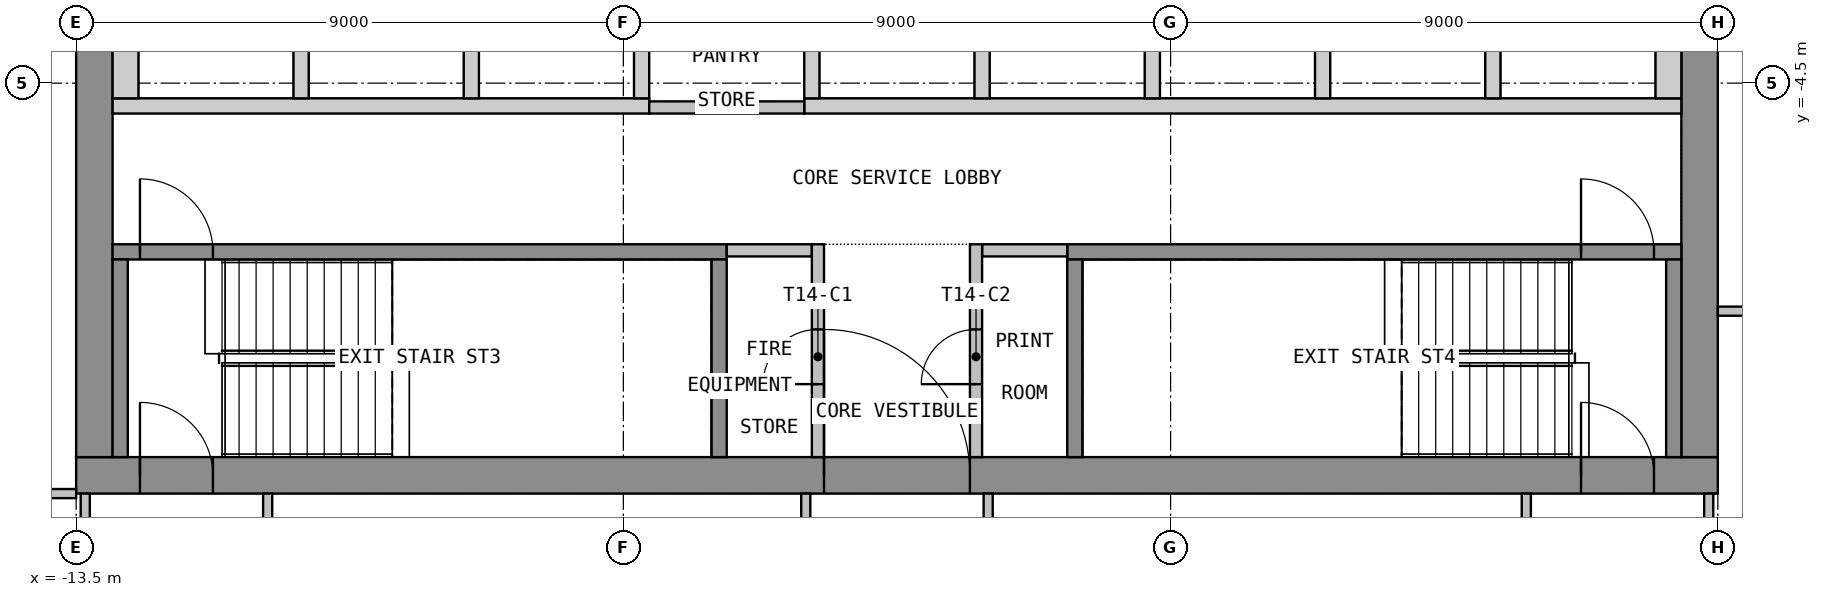
"""IFC4 building model, lengths in metres.
Left out: names, types, materials, properties, quantities, classifications, styles, units other than length and angle.
Written with IfcOpenShell. Run it as: python <this file> out.ifc"""

import sys

from ifc_helpers import new_model, si_unit, direction, frame, frame_2d, origin, place, context, subcontext, project, spatial, polyline, rectangle, outline, extrude, element, fill, save


model = new_model("IFC4")
c1 = context("Model", 3, precision=1e-05, world=origin(), true_north=direction((0.0, 1.0)))
c2 = subcontext(c1, "Body", "Model", "MODEL_VIEW")
j1 = project(units=[si_unit("LENGTHUNIT", "METRE"), si_unit("PLANEANGLEUNIT", "RADIAN")], contexts=[c1])
p1 = place(None, origin())
s1 = spatial("IfcSite", under=j1, at=p1, CompositionType="ELEMENT")
p2 = place(p1, origin())
s2 = spatial("IfcBuilding", under=s1, at=p2, CompositionType="ELEMENT")
p3 = place(p2, frame((0.0, 0.0, 195.6)))
s3 = spatial("IfcBuildingStorey", under=s2, at=p3, CompositionType="ELEMENT", Elevation=195.6)
p4 = place(p3, frame((-13.5, -10.95, 0.0), z_axis=(0.0, 0.0, 1.0), x_axis=(1.0, 0.0, 0.0)))
e1 = element("IfcWall", 1, at=p4, inside=s3, PredefinedType="SHEAR", context=c2, shape_type="SweptSolid", body=[
    extrude(rectangle(XDim=27.0, YDim=0.6, at=frame_2d((13.5, 0.0))), origin(), (0.0, 0.0, 1.0), 3.55),
])
p5 = place(p4, frame((12.3, 0.0, 0.0)))
e2 = element("IfcOpeningElement", 2, at=p5, cuts=e1, PredefinedType="OPENING", context=c2, shape_type="SweptSolid", body=[
    extrude(rectangle(XDim=2.4, YDim=2.1, at=frame_2d((1.2, 1.05))), frame((0.0, 0.31, 0.0), z_axis=(0.0, -1.0, 0.0), x_axis=(1.0, 0.0, 0.0)), (0.0, 0.0, 1.0), 0.62),
])
p6 = place(p4, frame((1.05, 0.0, 0.0)))
e3 = element("IfcOpeningElement", 3, at=p6, cuts=e1, PredefinedType="OPENING", context=c2, shape_type="SweptSolid", body=[
    extrude(rectangle(XDim=1.2, YDim=2.1, at=frame_2d((0.6, 1.05))), frame((0.0, 0.31, 0.0), z_axis=(0.0, -1.0, 0.0), x_axis=(1.0, 0.0, 0.0)), (0.0, 0.0, 1.0), 0.62),
])
p7 = place(p4, frame((24.75, 0.0, 0.0)))
e4 = element("IfcOpeningElement", 4, at=p7, cuts=e1, PredefinedType="OPENING", context=c2, shape_type="SweptSolid", body=[
    extrude(rectangle(XDim=1.2, YDim=2.1, at=frame_2d((0.6, 1.05))), frame((0.0, 0.31, 0.0), z_axis=(0.0, -1.0, 0.0), x_axis=(1.0, 0.0, 0.0)), (0.0, 0.0, 1.0), 0.62),
])
p8 = place(p3, frame((-13.2, -10.65, 0.0), z_axis=(0.0, 0.0, 1.0), x_axis=(0.0, 1.0, 0.0)))
e5 = element("IfcWall", 5, at=p8, inside=s3, PredefinedType="SHEAR", context=c2, shape_type="SweptSolid", body=[
    extrude(rectangle(XDim=21.3, YDim=0.6, at=frame_2d((10.65, 0.0))), origin(), (0.0, 0.0, 1.0), 3.55),
])
p9 = place(p8, frame((9.45, 0.0, 0.0)))
e6 = element("IfcOpeningElement", 6, at=p9, cuts=e5, PredefinedType="OPENING", context=c2, shape_type="SweptSolid", body=[
    extrude(rectangle(XDim=2.4, YDim=2.1, at=frame_2d((1.2, 1.05))), frame((0.0, 0.31, 0.0), z_axis=(0.0, -1.0, 0.0), x_axis=(1.0, 0.0, 0.0)), (0.0, 0.0, 1.0), 0.62),
])
p10 = place(p3, frame((13.2, -10.65, 0.0), z_axis=(0.0, 0.0, 1.0), x_axis=(0.0, 1.0, 0.0)))
e7 = element("IfcWall", 7, at=p10, inside=s3, PredefinedType="SHEAR", context=c2, shape_type="SweptSolid", body=[
    extrude(rectangle(XDim=21.3, YDim=0.6, at=frame_2d((10.65, 0.0))), origin(), (0.0, 0.0, 1.0), 3.55),
])
p11 = place(p10, frame((9.45, 0.0, 0.0)))
e8 = element("IfcOpeningElement", 8, at=p11, cuts=e7, PredefinedType="OPENING", context=c2, shape_type="SweptSolid", body=[
    extrude(rectangle(XDim=2.4, YDim=2.1, at=frame_2d((1.2, 1.05))), frame((0.0, 0.31, 0.0), z_axis=(0.0, -1.0, 0.0), x_axis=(1.0, 0.0, 0.0)), (0.0, 0.0, 1.0), 0.62),
])
p12 = place(p3, origin())
e9 = element("IfcWall", 9, at=p12, inside=s3, PredefinedType="SHEAR", context=c2, shape_type="SweptSolid", body=[
    extrude(outline(polyline([(-12.9, -5.0), (-4.075, -5.0), (-4.075, -4.75), (-12.9, -4.75), (-12.9, -5.0)])), origin(), (0.0, 0.0, 1.0), 3.55),
])
p13 = place(p3, origin())
e10 = element("IfcWall", 10, at=p13, inside=s3, PredefinedType="SHEAR", context=c2, shape_type="SweptSolid", body=[
    extrude(outline(polyline([(-1.525, -5.0), (12.9, -5.0), (12.9, -4.75), (-1.525, -4.75), (-1.525, -5.0)])), origin(), (0.0, 0.0, 1.0), 3.55),
])
p14 = place(p3, origin())
e11 = element("IfcWall", 11, at=p14, inside=s3, PredefinedType="SHEAR", context=c2, shape_type="SweptSolid", body=[
    extrude(outline(polyline([(-12.9, -4.75), (-12.475, -4.75), (-12.475, -3.05), (-12.9, -3.05), (-12.9, -4.75)])), origin(), (0.0, 0.0, 1.0), 3.55),
])
p15 = place(p3, origin())
e12 = element("IfcWall", 12, at=p15, inside=s3, PredefinedType="SHEAR", context=c2, shape_type="SweptSolid", body=[
    extrude(outline(polyline([(-9.925, -4.75), (-9.675, -4.75), (-9.675, -3.05), (-9.925, -3.05), (-9.925, -4.75)])), origin(), (0.0, 0.0, 1.0), 3.55),
])
p16 = place(p3, origin())
e13 = element("IfcWall", 13, at=p16, inside=s3, PredefinedType="SHEAR", context=c2, shape_type="SweptSolid", body=[
    extrude(outline(polyline([(-7.125, -4.75), (-6.875, -4.75), (-6.875, -3.05), (-7.125, -3.05), (-7.125, -4.75)])), origin(), (0.0, 0.0, 1.0), 3.55),
])
p17 = place(p3, origin())
e14 = element("IfcWall", 14, at=p17, inside=s3, PredefinedType="SHEAR", context=c2, shape_type="SweptSolid", body=[
    extrude(outline(polyline([(-4.325, -4.75), (-4.075, -4.75), (-4.075, -3.05), (-4.325, -3.05), (-4.325, -4.75)])), origin(), (0.0, 0.0, 1.0), 3.55),
])
p18 = place(p3, origin())
e15 = element("IfcWall", 15, at=p18, inside=s3, PredefinedType="SHEAR", context=c2, shape_type="SweptSolid", body=[
    extrude(outline(polyline([(-1.525, -4.75), (-1.275, -4.75), (-1.275, -2.05), (-1.525, -2.05), (-1.525, -4.75)])), origin(), (0.0, 0.0, 1.0), 3.55),
])
p19 = place(p3, origin())
e16 = element("IfcWall", 16, at=p19, inside=s3, PredefinedType="SHEAR", context=c2, shape_type="SweptSolid", body=[
    extrude(outline(polyline([(1.275, -4.75), (1.525, -4.75), (1.525, -2.05), (1.275, -2.05), (1.275, -4.75)])), origin(), (0.0, 0.0, 1.0), 3.55),
])
p20 = place(p3, origin())
e17 = element("IfcWall", 17, at=p20, inside=s3, PredefinedType="SHEAR", context=c2, shape_type="SweptSolid", body=[
    extrude(outline(polyline([(4.075, -4.75), (4.325, -4.75), (4.325, -2.05), (4.075, -2.05), (4.075, -4.75)])), origin(), (0.0, 0.0, 1.0), 3.55),
])
p21 = place(p3, origin())
e18 = element("IfcWall", 18, at=p21, inside=s3, PredefinedType="SHEAR", context=c2, shape_type="SweptSolid", body=[
    extrude(outline(polyline([(6.875, -4.75), (7.125, -4.75), (7.125, -2.05), (6.875, -2.05), (6.875, -4.75)])), origin(), (0.0, 0.0, 1.0), 3.55),
])
p22 = place(p3, origin())
e19 = element("IfcWall", 19, at=p22, inside=s3, PredefinedType="SHEAR", context=c2, shape_type="SweptSolid", body=[
    extrude(outline(polyline([(9.675, -4.75), (9.925, -4.75), (9.925, -2.05), (9.675, -2.05), (9.675, -4.75)])), origin(), (0.0, 0.0, 1.0), 3.55),
])
p23 = place(p3, origin())
e20 = element("IfcWall", 20, at=p23, inside=s3, PredefinedType="SHEAR", context=c2, shape_type="SweptSolid", body=[
    extrude(outline(polyline([(12.475, -4.75), (12.9, -4.75), (12.9, -2.05), (12.475, -2.05), (12.475, -4.75)])), origin(), (0.0, 0.0, 1.0), 3.55),
])
p24 = place(p3, frame((-12.9, -7.275, 0.0), z_axis=(0.0, 0.0, 1.0), x_axis=(1.0, 0.0, 0.0)))
e21 = element("IfcWall", 21, at=p24, inside=s3, PredefinedType="SHEAR", context=c2, shape_type="SweptSolid", body=[
    extrude(rectangle(XDim=10.1, YDim=0.25, at=frame_2d((5.05, 0.0))), origin(), (0.0, 0.0, 1.0), 3.55),
])
p25 = place(p24, frame((0.45, 0.0, 0.0)))
e22 = element("IfcOpeningElement", 22, at=p25, cuts=e21, PredefinedType="OPENING", context=c2, shape_type="SweptSolid", body=[
    extrude(rectangle(XDim=1.2, YDim=2.1, at=frame_2d((0.6, 1.05))), frame((0.0, 0.135, 0.0), z_axis=(0.0, -1.0, 0.0), x_axis=(1.0, 0.0, 0.0)), (0.0, 0.0, 1.0), 0.27),
])
for number, where, z_axis, x_axis in (
    (23, (-12.775, -10.65, 0.0), (0.0, 0.0, 1.0), (0.0, 1.0, 0.0)),
    (24, (-2.925, -10.65, 0.0), (0.0, 0.0, 1.0), (0.0, 1.0, 0.0)),
):
    element("IfcWall", number, at=place(p3, frame(where, z_axis=z_axis, x_axis=x_axis)), inside=s3, PredefinedType="SHEAR", context=c2, shape_type="SweptSolid", body=[
        extrude(rectangle(XDim=3.25, YDim=0.25, at=frame_2d((1.625, 0.0))), origin(), (0.0, 0.0, 1.0), 3.55),
    ])
p26 = place(p3, frame((2.8, -7.275, 0.0), z_axis=(0.0, 0.0, 1.0), x_axis=(1.0, 0.0, 0.0)))
e25 = element("IfcWall", 25, at=p26, inside=s3, PredefinedType="SHEAR", context=c2, shape_type="SweptSolid", body=[
    extrude(rectangle(XDim=10.1, YDim=0.25, at=frame_2d((5.05, 0.0))), origin(), (0.0, 0.0, 1.0), 3.55),
])
p27 = place(p26, frame((8.45, 0.0, 0.0)))
e26 = element("IfcOpeningElement", 26, at=p27, cuts=e25, PredefinedType="OPENING", context=c2, shape_type="SweptSolid", body=[
    extrude(rectangle(XDim=1.2, YDim=2.1, at=frame_2d((0.6, 1.05))), frame((0.0, 0.135, 0.0), z_axis=(0.0, -1.0, 0.0), x_axis=(1.0, 0.0, 0.0)), (0.0, 0.0, 1.0), 0.27),
])
for number, where, z_axis, x_axis in (
    (27, (2.925, -10.65, 0.0), (0.0, 0.0, 1.0), (0.0, 1.0, 0.0)),
    (28, (12.775, -10.65, 0.0), (0.0, 0.0, 1.0), (0.0, 1.0, 0.0)),
):
    element("IfcWall", number, at=place(p3, frame(where, z_axis=z_axis, x_axis=x_axis)), inside=s3, PredefinedType="SHEAR", context=c2, shape_type="SweptSolid", body=[
        extrude(rectangle(XDim=3.25, YDim=0.25, at=frame_2d((1.625, 0.0))), origin(), (0.0, 0.0, 1.0), 3.55),
    ])
for number, where, z_axis, x_axis in (
    (29, (-2.8, -7.25, 0.0), (0.0, 0.0, 1.0), (1.0, 0.0, 0.0)),
    (30, (1.4, -7.25, 0.0), (0.0, 0.0, 1.0), (1.0, 0.0, 0.0)),
):
    element("IfcWall", number, at=place(p3, frame(where, z_axis=z_axis, x_axis=x_axis)), inside=s3, PredefinedType="PARTITIONING", context=c2, shape_type="SweptSolid", body=[
        extrude(rectangle(XDim=1.4, YDim=0.2, at=frame_2d((0.7, 0.0))), origin(), (0.0, 0.0, 1.0), 3.55),
    ])
p28 = place(p3, frame((-1.3, -10.65, 0.0), z_axis=(0.0, 0.0, 1.0), x_axis=(0.0, 1.0, 0.0)))
e31 = element("IfcWall", 31, at=p28, inside=s3, PredefinedType="PARTITIONING", context=c2, shape_type="SweptSolid", body=[
    extrude(rectangle(XDim=3.5, YDim=0.2, at=frame_2d((1.75, 0.0))), origin(), (0.0, 0.0, 1.0), 3.55),
])
p29 = place(p28, frame((1.2, 0.0, 0.0)))
e32 = element("IfcOpeningElement", 32, at=p29, cuts=e31, PredefinedType="OPENING", context=c2, shape_type="SweptSolid", body=[
    extrude(rectangle(XDim=0.9, YDim=2.1, at=frame_2d((0.45, 1.05))), frame((0.0, 0.11, 0.0), z_axis=(0.0, -1.0, 0.0), x_axis=(1.0, 0.0, 0.0)), (0.0, 0.0, 1.0), 0.22),
])
p30 = place(p3, frame((1.3, -10.65, 0.0), z_axis=(0.0, 0.0, 1.0), x_axis=(0.0, 1.0, 0.0)))
e33 = element("IfcWall", 33, at=p30, inside=s3, PredefinedType="PARTITIONING", context=c2, shape_type="SweptSolid", body=[
    extrude(rectangle(XDim=3.5, YDim=0.2, at=frame_2d((1.75, 0.0))), origin(), (0.0, 0.0, 1.0), 3.55),
])
p31 = place(p30, frame((1.2, 0.0, 0.0)))
e34 = element("IfcOpeningElement", 34, at=p31, cuts=e33, PredefinedType="OPENING", context=c2, shape_type="SweptSolid", body=[
    extrude(rectangle(XDim=0.9, YDim=2.1, at=frame_2d((0.45, 1.05))), frame((0.0, 0.11, 0.0), z_axis=(0.0, -1.0, 0.0), x_axis=(1.0, 0.0, 0.0)), (0.0, 0.0, 1.0), 0.22),
])
p32 = place(p3, frame((-4.075, -4.9, 0.0), z_axis=(0.0, 0.0, 1.0), x_axis=(1.0, 0.0, 0.0)))
e35 = element("IfcWall", 35, at=p32, inside=s3, PredefinedType="PARTITIONING", context=c2, shape_type="SweptSolid", body=[
    extrude(rectangle(XDim=2.55, YDim=0.2, at=frame_2d((1.275, 0.0))), origin(), (0.0, 0.0, 1.0), 3.55),
])
for number, where, z_axis, x_axis in (
    (36, (-13.5, -11.25, 0.0), (0.0, 0.0, 1.0), (-1.0, 0.0, 0.0)),
    (37, (-13.35, -11.25, 0.0), (0.0, 0.0, 1.0), (0.0, -1.0, 0.0)),
):
    element("IfcWall", number, at=place(p3, frame(where, z_axis=z_axis, x_axis=x_axis)), inside=s3, PredefinedType="PARTITIONING", context=c2, shape_type="SweptSolid", body=[
        extrude(rectangle(XDim=4.425, YDim=0.15, at=frame_2d((2.212, 0.0))), origin(), (0.0, 0.0, 1.0), 3.55),
    ])
p33 = place(p3, frame((-10.35, -15.825, 0.0), z_axis=(0.0, 0.0, 1.0), x_axis=(0.0, 1.0, 0.0)))
e38 = element("IfcWall", 38, at=p33, inside=s3, PredefinedType="PARTITIONING", context=c2, shape_type="SweptSolid", body=[
    extrude(rectangle(XDim=4.575, YDim=0.15, at=frame_2d((2.288, 0.0))), origin(), (0.0, 0.0, 1.0), 3.55),
])
p34 = place(p3, frame((-1.5, -11.25, 0.0), z_axis=(0.0, 0.0, 1.0), x_axis=(0.0, -1.0, 0.0)))
e39 = element("IfcWall", 39, at=p34, inside=s3, PredefinedType="PARTITIONING", context=c2, shape_type="SweptSolid", body=[
    extrude(rectangle(XDim=4.425, YDim=0.15, at=frame_2d((2.212, 0.0))), origin(), (0.0, 0.0, 1.0), 3.55),
])
p35 = place(p3, frame((1.5, -15.825, 0.0), z_axis=(0.0, 0.0, 1.0), x_axis=(0.0, 1.0, 0.0)))
e40 = element("IfcWall", 40, at=p35, inside=s3, PredefinedType="PARTITIONING", context=c2, shape_type="SweptSolid", body=[
    extrude(rectangle(XDim=4.575, YDim=0.15, at=frame_2d((2.288, 0.0))), origin(), (0.0, 0.0, 1.0), 3.55),
])
p36 = place(p3, frame((10.35, -11.25, 0.0), z_axis=(0.0, 0.0, 1.0), x_axis=(0.0, -1.0, 0.0)))
e41 = element("IfcWall", 41, at=p36, inside=s3, PredefinedType="PARTITIONING", context=c2, shape_type="SweptSolid", body=[
    extrude(rectangle(XDim=4.425, YDim=0.15, at=frame_2d((2.212, 0.0))), origin(), (0.0, 0.0, 1.0), 3.55),
])
p37 = place(p3, frame((13.35, -15.825, 0.0), z_axis=(0.0, 0.0, 1.0), x_axis=(0.0, 1.0, 0.0)))
e42 = element("IfcWall", 42, at=p37, inside=s3, PredefinedType="PARTITIONING", context=c2, shape_type="SweptSolid", body=[
    extrude(rectangle(XDim=4.575, YDim=0.15, at=frame_2d((2.288, 0.0))), origin(), (0.0, 0.0, 1.0), 3.55),
])
p38 = place(p3, frame((13.5, -8.25, 0.0), z_axis=(0.0, 0.0, 1.0), x_axis=(1.0, 0.0, 0.0)))
e43 = element("IfcWall", 43, at=p38, inside=s3, PredefinedType="PARTITIONING", context=c2, shape_type="SweptSolid", body=[
    extrude(rectangle(XDim=4.425, YDim=0.15, at=frame_2d((2.212, 0.0))), origin(), (0.0, 0.0, 1.0), 3.55),
])
p39 = place(p5, origin())
e44 = element("IfcDoor", 44, at=p39, inside=s3, OperationType="DOUBLE_DOOR_DOUBLE_SWING", PredefinedType="DOOR", context=c2, shape_type="SweptSolid", body=[
    extrude(rectangle(XDim=2.4, YDim=2.1, at=frame_2d((1.2, 1.05))), frame((0.0, 0.025, 0.0), z_axis=(0.0, -1.0, 0.0), x_axis=(1.0, 0.0, 0.0)), (0.0, 0.0, 1.0), 0.05),
])
fill(e2, e44)
p40 = place(p6, origin())
e45 = element("IfcDoor", 45, at=p40, inside=s3, OperationType="SINGLE_SWING_RIGHT", PredefinedType="DOOR", context=c2, shape_type="SweptSolid", body=[
    extrude(rectangle(XDim=1.2, YDim=2.1, at=frame_2d((0.6, 1.05))), frame((0.0, 0.025, 0.0), z_axis=(0.0, -1.0, 0.0), x_axis=(1.0, 0.0, 0.0)), (0.0, 0.0, 1.0), 0.05),
])
fill(e3, e45)
p41 = place(p7, origin())
e46 = element("IfcDoor", 46, at=p41, inside=s3, OperationType="SINGLE_SWING_RIGHT", PredefinedType="DOOR", context=c2, shape_type="SweptSolid", body=[
    extrude(rectangle(XDim=1.2, YDim=2.1, at=frame_2d((0.6, 1.05))), frame((0.0, 0.025, 0.0), z_axis=(0.0, -1.0, 0.0), x_axis=(1.0, 0.0, 0.0)), (0.0, 0.0, 1.0), 0.05),
])
fill(e4, e46)
p42 = place(p25, origin())
e47 = element("IfcDoor", 47, at=p42, inside=s3, OperationType="SINGLE_SWING_LEFT", PredefinedType="DOOR", context=c2, shape_type="SweptSolid", body=[
    extrude(rectangle(XDim=1.2, YDim=2.1, at=frame_2d((0.6, 1.05))), frame((0.0, 0.025, 0.0), z_axis=(0.0, -1.0, 0.0), x_axis=(1.0, 0.0, 0.0)), (0.0, 0.0, 1.0), 0.05),
])
fill(e22, e47)
p43 = place(p27, origin())
e48 = element("IfcDoor", 48, at=p43, inside=s3, OperationType="SINGLE_SWING_LEFT", PredefinedType="DOOR", context=c2, shape_type="SweptSolid", body=[
    extrude(rectangle(XDim=1.2, YDim=2.1, at=frame_2d((0.6, 1.05))), frame((0.0, 0.025, 0.0), z_axis=(0.0, -1.0, 0.0), x_axis=(1.0, 0.0, 0.0)), (0.0, 0.0, 1.0), 0.05),
])
fill(e26, e48)
p44 = place(p29, origin())
e49 = element("IfcDoor", 49, at=p44, inside=s3, OperationType="SINGLE_SWING_LEFT", PredefinedType="DOOR", context=c2, shape_type="SweptSolid", body=[
    extrude(rectangle(XDim=0.9, YDim=2.1, at=frame_2d((0.45, 1.05))), frame((0.0, 0.025, 0.0), z_axis=(0.0, -1.0, 0.0), x_axis=(1.0, 0.0, 0.0)), (0.0, 0.0, 1.0), 0.05),
])
fill(e32, e49)
p45 = place(p31, origin())
e50 = element("IfcDoor", 50, at=p45, inside=s3, OperationType="SINGLE_SWING_LEFT", PredefinedType="DOOR", context=c2, shape_type="SweptSolid", body=[
    extrude(rectangle(XDim=0.9, YDim=2.1, at=frame_2d((0.45, 1.05))), frame((0.0, 0.025, 0.0), z_axis=(0.0, -1.0, 0.0), x_axis=(1.0, 0.0, 0.0)), (0.0, 0.0, 1.0), 0.05),
])
fill(e34, e50)
save(model, sys.argv[1])
